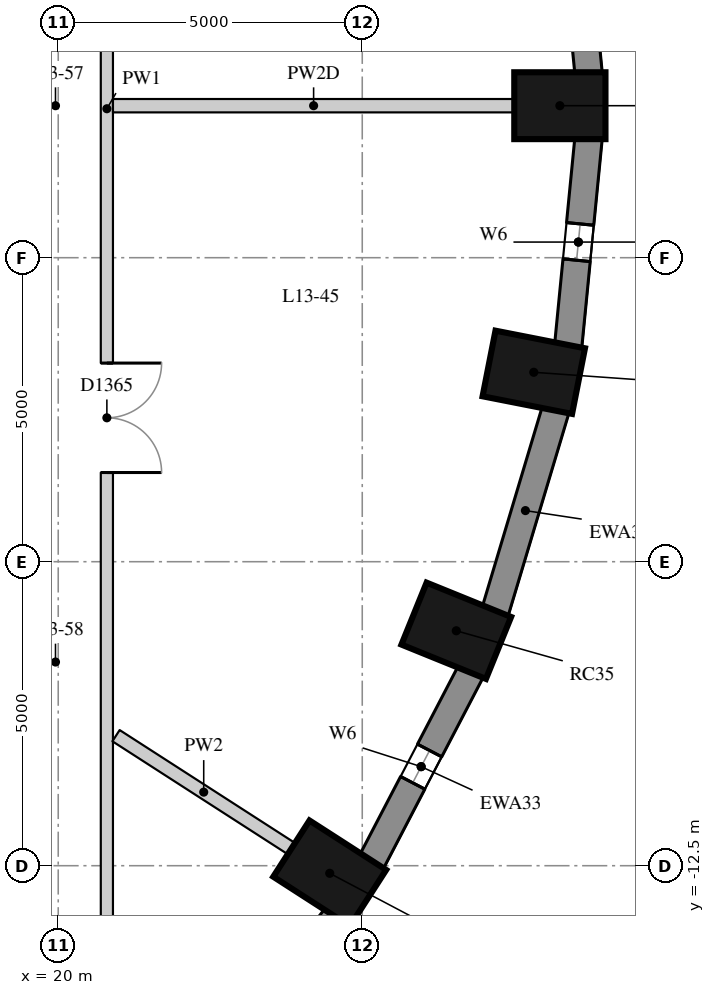
"""IFC4 building model, lengths in metres.
Left out: names, types, materials, properties, quantities, classifications, styles, units other than length and angle.
Written with IfcOpenShell. Run it as: python <this file> out.ifc"""

import sys

from ifc_helpers import new_model, si_unit, direction, frame, frame_2d, origin, origin_2d, place, context, subcontext, project, spatial, rectangle, extrude, element, fill, save


model = new_model("IFC4")
c1 = context("Model", 3, precision=1e-05, world=origin(), true_north=direction((0.0, 1.0)))
c2 = subcontext(c1, "Body", "Model", "MODEL_VIEW")
j1 = project(units=[si_unit("LENGTHUNIT", "METRE"), si_unit("PLANEANGLEUNIT", "RADIAN")], contexts=[c1])
p1 = place(None, origin())
s1 = spatial("IfcSite", under=j1, at=p1, CompositionType="ELEMENT")
p2 = place(p1, origin())
s2 = spatial("IfcBuilding", under=s1, at=p2, CompositionType="ELEMENT")
p3 = place(p2, frame((0.0, 0.0, 51.4)))
s3 = spatial("IfcBuildingStorey", under=s2, at=p3, CompositionType="ELEMENT", Elevation=51.4)
for number, where, z_axis, x_axis in (
    (1, (28.25, 0.0, 0.0), (0.0, 0.0, 1.0), (1.0, 0.0, 0.0)),
    (2, (24.465, -12.625, 0.0), (0.0, 0.0, 1.0), (0.841, -0.541, 0.0)),
    (3, (26.546, -8.636, 0.0), (0.0, 0.0, 1.0), (0.927, -0.376, 0.0)),
    (4, (27.821, -4.385, 0.0), (0.0, 0.0, 1.0), (0.981, -0.193, 0.0)),
):
    element("IfcColumn", number, at=place(p3, frame(where, z_axis=z_axis, x_axis=x_axis)), inside=s3, PredefinedType="COLUMN", context=c2, shape_type="SweptSolid", body=[
        extrude(rectangle(XDim=1.5, YDim=1.1, at=origin_2d()), origin(), (0.0, 0.0, 1.0), 3.3),
    ])
p4 = place(p3, frame((28.722, 0.53, 0.0), z_axis=(0.0, 0.0, 1.0), x_axis=(-0.097389581596, 0.995246336038, 0.0)))
e5 = element("IfcWall", 5, at=p4, inside=s3, PredefinedType="SOLIDWALL", context=c2, shape_type="SweptSolid", body=[
    extrude(rectangle(XDim=3.442, YDim=0.45, at=frame_2d((1.721, 0.0))), origin(), (0.0, 0.0, 1.0), 3.02),
])
p5 = place(p3, frame((22.352, -16.17, 0.0), z_axis=(0.0, 0.0, 1.0), x_axis=(0.616661975264, 0.787228053529, 0.0)))
e6 = element("IfcWall", 6, at=p5, inside=s3, PredefinedType="SOLIDWALL", context=c2, shape_type="SweptSolid", body=[
    extrude(rectangle(XDim=3.61, YDim=0.45, at=frame_2d((1.805, 0.0))), origin(), (0.0, 0.0, 1.0), 3.02),
])
p6 = place(p3, frame((25.152, -12.437, 0.0), z_axis=(0.0, 0.0, 1.0), x_axis=(0.462492775226, 0.886623050041, 0.0)))
e7 = element("IfcWall", 7, at=p6, inside=s3, PredefinedType="SOLIDWALL", context=c2, shape_type="SweptSolid", body=[
    extrude(rectangle(XDim=3.532, YDim=0.45, at=frame_2d((1.766, 0.0))), origin(), (0.0, 0.0, 1.0), 3.02),
])
p7 = place(p6, frame((1.466, 0.0, 0.4)))
e8 = element("IfcOpeningElement", 8, at=p7, cuts=e7, PredefinedType="OPENING", context=c2, shape_type="SweptSolid", body=[
    extrude(rectangle(XDim=0.6, YDim=1.75, at=frame_2d((0.3, 0.875))), frame((0.0, 0.235, 0.0), z_axis=(0.0, -1.0, 0.0), x_axis=(1.0, 0.0, 0.0)), (0.0, 0.0, 1.0), 0.47),
])
p8 = place(p3, frame((27.185, -8.323, 0.0), z_axis=(0.0, 0.0, 1.0), x_axis=(0.287064133733, 0.957911364963, 0.0)))
e9 = element("IfcWall", 9, at=p8, inside=s3, PredefinedType="SOLIDWALL", context=c2, shape_type="SweptSolid", body=[
    extrude(rectangle(XDim=3.473, YDim=0.45, at=frame_2d((1.737, 0.0))), origin(), (0.0, 0.0, 1.0), 3.02),
])
p9 = place(p3, frame((28.387, -3.956, 0.0), z_axis=(0.0, 0.0, 1.0), x_axis=(0.097389581596, 0.995246336038, 0.0)))
e10 = element("IfcWall", 10, at=p9, inside=s3, PredefinedType="SOLIDWALL", context=c2, shape_type="SweptSolid", body=[
    extrude(rectangle(XDim=3.442, YDim=0.45, at=frame_2d((1.721, 0.0))), origin(), (0.0, 0.0, 1.0), 3.02),
])
p10 = place(p9, frame((1.421, 0.0, 0.4)))
e11 = element("IfcOpeningElement", 11, at=p10, cuts=e10, PredefinedType="OPENING", context=c2, shape_type="SweptSolid", body=[
    extrude(rectangle(XDim=0.6, YDim=1.75, at=frame_2d((0.3, 0.875))), frame((0.0, 0.235, 0.0), z_axis=(0.0, -1.0, 0.0), x_axis=(1.0, 0.0, 0.0)), (0.0, 0.0, 1.0), 0.47),
])
p11 = place(p3, frame((20.8, 13.5, 0.0), z_axis=(0.0, 0.0, 1.0), x_axis=(0.0, -1.0, 0.0)))
e12 = element("IfcWall", 12, at=p11, inside=s3, PredefinedType="PARTITIONING", context=c2, shape_type="SweptSolid", body=[
    extrude(rectangle(XDim=27.1, YDim=0.2, at=frame_2d((13.55, 0.0))), origin(), (0.0, 0.0, 1.0), 3.02),
])
p12 = place(p11, frame((17.733, 0.0, 0.0)))
e13 = element("IfcOpeningElement", 13, at=p12, cuts=e12, PredefinedType="OPENING", context=c2, shape_type="SweptSolid", body=[
    extrude(rectangle(XDim=1.8, YDim=2.1, at=frame_2d((0.9, 1.05))), frame((0.0, 0.11, 0.0), z_axis=(0.0, -1.0, 0.0), x_axis=(1.0, 0.0, 0.0)), (0.0, 0.0, 1.0), 0.22),
])
p13 = place(p11, frame((9.448, 0.0, 0.0)))
e14 = element("IfcOpeningElement", 14, at=p13, cuts=e12, PredefinedType="OPENING", context=c2, shape_type="SweptSolid", body=[
    extrude(rectangle(XDim=1.8, YDim=2.1, at=frame_2d((0.9, 1.05))), frame((0.0, 0.11, 0.0), z_axis=(0.0, -1.0, 0.0), x_axis=(1.0, 0.0, 0.0)), (0.0, 0.0, 1.0), 0.22),
])
p14 = place(p11, frame((2.704, 0.0, 0.0)))
e15 = element("IfcOpeningElement", 15, at=p14, cuts=e12, PredefinedType="OPENING", context=c2, shape_type="SweptSolid", body=[
    extrude(rectangle(XDim=1.8, YDim=2.1, at=frame_2d((0.9, 1.05))), frame((0.0, 0.11, 0.0), z_axis=(0.0, -1.0, 0.0), x_axis=(1.0, 0.0, 0.0)), (0.0, 0.0, 1.0), 0.22),
])
p15 = place(p3, frame((27.5, 0.0, 0.0), z_axis=(0.0, 0.0, 1.0), x_axis=(-1.0, 0.0, 0.0)))
e16 = element("IfcWall", 16, at=p15, inside=s3, PredefinedType="PARTITIONING", context=c2, shape_type="SweptSolid", body=[
    extrude(rectangle(XDim=6.6, YDim=0.22, at=frame_2d((3.3, 0.0))), origin(), (0.0, 0.0, 1.0), 2.47),
])
p16 = place(p3, frame((23.835, -12.219, 0.0), z_axis=(0.0, 0.0, 1.0), x_axis=(-0.840694872373, 0.541509124176, 0.0)))
e17 = element("IfcWall", 17, at=p16, inside=s3, PredefinedType="PARTITIONING", context=c2, shape_type="SweptSolid", body=[
    extrude(rectangle(XDim=3.43, YDim=0.22, at=frame_2d((1.715, 0.0))), origin(), (0.0, 0.0, 1.0), 3.02),
])
p17 = place(p7, origin())
e18 = element("IfcWindow", 18, at=p17, inside=s3, PartitioningType="SINGLE_PANEL", PredefinedType="WINDOW", context=c2, shape_type="SweptSolid", body=[
    extrude(rectangle(XDim=0.6, YDim=1.75, at=frame_2d((0.3, 0.875))), frame((0.0, 0.035, 0.0), z_axis=(0.0, -1.0, 0.0), x_axis=(1.0, 0.0, 0.0)), (0.0, 0.0, 1.0), 0.06),
])
fill(e8, e18)
p18 = place(p10, origin())
e19 = element("IfcWindow", 19, at=p18, inside=s3, PartitioningType="SINGLE_PANEL", PredefinedType="WINDOW", context=c2, shape_type="SweptSolid", body=[
    extrude(rectangle(XDim=0.6, YDim=1.75, at=frame_2d((0.3, 0.875))), frame((0.0, 0.035, 0.0), z_axis=(0.0, -1.0, 0.0), x_axis=(1.0, 0.0, 0.0)), (0.0, 0.0, 1.0), 0.06),
])
fill(e11, e19)
p19 = place(p12, origin())
e20 = element("IfcDoor", 20, at=p19, inside=s3, OperationType="DOUBLE_DOOR_SINGLE_SWING", PredefinedType="DOOR", context=c2, shape_type="SweptSolid", body=[
    extrude(rectangle(XDim=1.8, YDim=2.1, at=frame_2d((0.9, 1.05))), frame((0.0, 0.025, 0.0), z_axis=(0.0, -1.0, 0.0), x_axis=(1.0, 0.0, 0.0)), (0.0, 0.0, 1.0), 0.05),
])
fill(e13, e20)
save(model, sys.argv[1])
